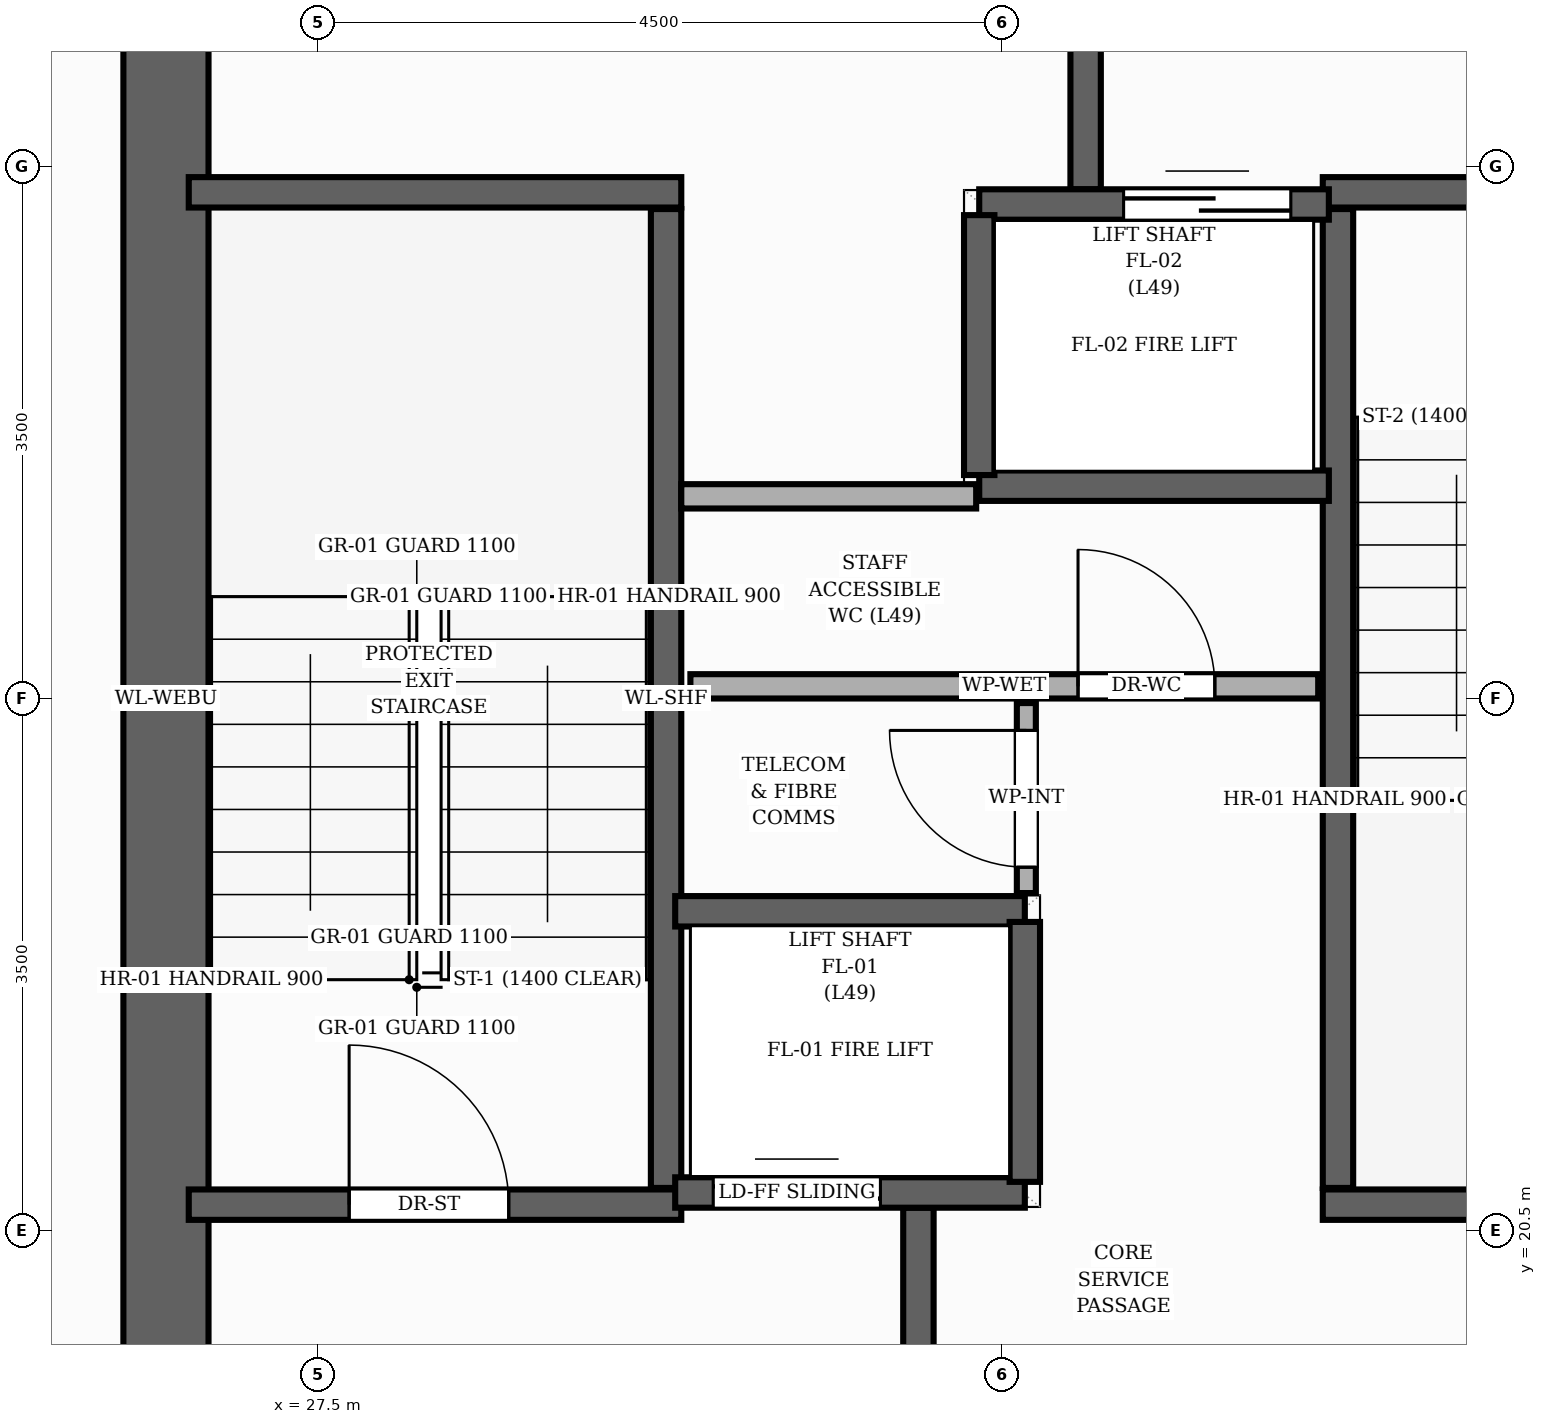
"""IFC4 building model, lengths in metres.
Left out: names, types, materials, properties, quantities, classifications, styles, units other than length and angle.
Written with IfcOpenShell. Run it as: python <this file> out.ifc"""

import sys

from ifc_helpers import new_model, si_unit, direction, frame, frame_2d, origin, place, context, subcontext, project, spatial, rectangle, extrude, element, fill, save


model = new_model("IFC4")
c1 = context("Model", 3, precision=1e-05, world=origin(), true_north=direction((0.0, 1.0)))
c2 = subcontext(c1, "Body", "Model", "MODEL_VIEW")
j1 = project(units=[si_unit("LENGTHUNIT", "METRE"), si_unit("PLANEANGLEUNIT", "RADIAN")], contexts=[c1])
p1 = place(None, origin())
s1 = spatial("IfcSite", under=j1, at=p1, CompositionType="ELEMENT")
p2 = place(p1, origin())
s2 = spatial("IfcBuilding", under=s1, at=p2, CompositionType="ELEMENT")
p3 = place(p2, frame((0.0, 0.0, 166.24)))
s3 = spatial("IfcBuildingStorey", under=s2, at=p3, CompositionType="ELEMENT", Elevation=166.24)
p4 = place(p3, frame((26.5, 17.3, 0.0), z_axis=(0.0, 0.0, 1.0), x_axis=(0.0, 1.0, 0.0)))
e1 = element("IfcWall", 1, at=p4, inside=s3, PredefinedType="SHEAR", context=c2, shape_type="SweptSolid", body=[
    extrude(rectangle(XDim=13.4, YDim=0.56, at=frame_2d((6.7, 0.0))), origin(), (0.0, 0.0, 1.0), 3.2),
])
p5 = place(p3, frame((29.79, 20.78, 0.0), z_axis=(0.0, 0.0, 1.0), x_axis=(0.0, 1.0, 0.0)))
e2 = element("IfcWall", 2, at=p5, inside=s3, PredefinedType="SHEAR", context=c2, shape_type="SweptSolid", body=[
    extrude(rectangle(XDim=6.44, YDim=0.2, at=frame_2d((3.22, 0.0))), origin(), (0.0, 0.0, 1.0), 3.2),
])
p6 = place(p3, frame((26.65, 27.33, 0.0), z_axis=(0.0, 0.0, 1.0), x_axis=(1.0, 0.0, 0.0)))
e3 = element("IfcWall", 3, at=p6, inside=s3, PredefinedType="SHEAR", context=c2, shape_type="SweptSolid", body=[
    extrude(rectangle(XDim=3.24, YDim=0.2, at=frame_2d((1.62, 0.0))), origin(), (0.0, 0.0, 1.0), 3.2),
])
p7 = place(p3, frame((26.65, 20.67, 0.0), z_axis=(0.0, 0.0, 1.0), x_axis=(1.0, 0.0, 0.0)))
e4 = element("IfcWall", 4, at=p7, inside=s3, PredefinedType="SHEAR", context=c2, shape_type="SweptSolid", body=[
    extrude(rectangle(XDim=3.24, YDim=0.2, at=frame_2d((1.62, 0.0))), origin(), (0.0, 0.0, 1.0), 3.2),
])
p8 = place(p7, frame((1.055, 0.0, 0.0)))
e5 = element("IfcOpeningElement", 5, at=p8, cuts=e4, PredefinedType="OPENING", context=c2, shape_type="SweptSolid", body=[
    extrude(rectangle(XDim=1.05, YDim=2.15, at=frame_2d((0.525, 1.075))), frame((0.0, 0.11, 0.0), z_axis=(0.0, -1.0, 0.0), x_axis=(1.0, 0.0, 0.0)), (0.0, 0.0, 1.0), 0.22),
])
p9 = place(p3, frame((34.21, 20.78, 0.0), z_axis=(0.0, 0.0, 1.0), x_axis=(0.0, 1.0, 0.0)))
e6 = element("IfcWall", 6, at=p9, inside=s3, PredefinedType="SHEAR", context=c2, shape_type="SweptSolid", body=[
    extrude(rectangle(XDim=6.44, YDim=0.2, at=frame_2d((3.22, 0.0))), origin(), (0.0, 0.0, 1.0), 3.2),
])
p10 = place(p3, frame((34.11, 20.67, 0.0), z_axis=(0.0, 0.0, 1.0), x_axis=(1.0, 0.0, 0.0)))
e7 = element("IfcWall", 7, at=p10, inside=s3, PredefinedType="SHEAR", context=c2, shape_type="SweptSolid", body=[
    extrude(rectangle(XDim=3.24, YDim=0.2, at=frame_2d((1.62, 0.0))), origin(), (0.0, 0.0, 1.0), 3.2),
])
p11 = place(p3, frame((34.11, 27.33, 0.0), z_axis=(0.0, 0.0, 1.0), x_axis=(1.0, 0.0, 0.0)))
e8 = element("IfcWall", 8, at=p11, inside=s3, PredefinedType="SHEAR", context=c2, shape_type="SweptSolid", body=[
    extrude(rectangle(XDim=3.24, YDim=0.2, at=frame_2d((1.62, 0.0))), origin(), (0.0, 0.0, 1.0), 3.2),
])
p12 = place(p11, frame((1.135, 0.0, 0.0)))
e9 = element("IfcOpeningElement", 9, at=p12, cuts=e8, PredefinedType="OPENING", context=c2, shape_type="SweptSolid", body=[
    extrude(rectangle(XDim=1.05, YDim=2.15, at=frame_2d((0.525, 1.075))), frame((0.0, 0.11, 0.0), z_axis=(0.0, -1.0, 0.0), x_axis=(1.0, 0.0, 0.0)), (0.0, 0.0, 1.0), 0.22),
])
for number, where, z_axis, x_axis in (
    (10, (31.45, 17.15, 0.0), (0.0, 0.0, 1.0), (0.0, 1.0, 0.0)),
    (11, (32.55, 27.35, 0.0), (0.0, 0.0, 1.0), (0.0, 1.0, 0.0)),
):
    element("IfcWall", number, at=place(p3, frame(where, z_axis=z_axis, x_axis=x_axis)), inside=s3, PredefinedType="SHEAR", context=c2, shape_type="SweptSolid", body=[
        extrude(rectangle(XDim=3.5, YDim=0.2, at=frame_2d((1.75, 0.0))), origin(), (0.0, 0.0, 1.0), 3.2),
    ])
p13 = place(p3, frame((29.85, 20.75, 0.0), z_axis=(0.0, 0.0, 1.0), x_axis=(1.0, 0.0, 0.0)))
e12 = element("IfcWall", 12, at=p13, inside=s3, PredefinedType="SHEAR", context=c2, shape_type="SweptSolid", body=[
    extrude(rectangle(XDim=2.3, YDim=0.2, at=frame_2d((1.15, 0.0))), origin(), (0.0, 0.0, 1.0), 3.2),
])
p14 = place(p13, frame((0.25, 0.0, 0.0)))
e13 = element("IfcOpeningElement", 13, at=p14, cuts=e12, PredefinedType="OPENING", context=c2, shape_type="SweptSolid", body=[
    extrude(rectangle(XDim=1.1, YDim=2.15, at=frame_2d((0.55, 1.075))), frame((0.0, 0.11, 0.0), z_axis=(0.0, -1.0, 0.0), x_axis=(1.0, 0.0, 0.0)), (0.0, 0.0, 1.0), 0.22),
])
p15 = place(p3, frame((29.85, 22.6, 0.0), z_axis=(0.0, 0.0, 1.0), x_axis=(1.0, 0.0, 0.0)))
e14 = element("IfcWall", 14, at=p15, inside=s3, PredefinedType="SHEAR", context=c2, shape_type="SweptSolid", body=[
    extrude(rectangle(XDim=2.3, YDim=0.2, at=frame_2d((1.15, 0.0))), origin(), (0.0, 0.0, 1.0), 3.2),
])
p16 = place(p3, frame((32.15, 20.82, 0.0), z_axis=(0.0, 0.0, 1.0), x_axis=(0.0, 1.0, 0.0)))
e15 = element("IfcWall", 15, at=p16, inside=s3, PredefinedType="SHEAR", context=c2, shape_type="SweptSolid", body=[
    extrude(rectangle(XDim=1.71, YDim=0.2, at=frame_2d((0.855, 0.0))), origin(), (0.0, 0.0, 1.0), 3.2),
])
p17 = place(p3, frame((31.85, 27.25, 0.0), z_axis=(0.0, 0.0, 1.0), x_axis=(1.0, 0.0, 0.0)))
e16 = element("IfcWall", 16, at=p17, inside=s3, PredefinedType="SHEAR", context=c2, shape_type="SweptSolid", body=[
    extrude(rectangle(XDim=2.3, YDim=0.2, at=frame_2d((1.15, 0.0))), origin(), (0.0, 0.0, 1.0), 3.2),
])
p18 = place(p17, frame((0.95, 0.0, 0.0)))
e17 = element("IfcOpeningElement", 17, at=p18, cuts=e16, PredefinedType="OPENING", context=c2, shape_type="SweptSolid", body=[
    extrude(rectangle(XDim=1.1, YDim=2.15, at=frame_2d((0.55, 1.075))), frame((0.0, 0.11, 0.0), z_axis=(0.0, -1.0, 0.0), x_axis=(1.0, 0.0, 0.0)), (0.0, 0.0, 1.0), 0.22),
])
p19 = place(p3, frame((31.85, 25.4, 0.0), z_axis=(0.0, 0.0, 1.0), x_axis=(1.0, 0.0, 0.0)))
e18 = element("IfcWall", 18, at=p19, inside=s3, PredefinedType="SHEAR", context=c2, shape_type="SweptSolid", body=[
    extrude(rectangle(XDim=2.3, YDim=0.2, at=frame_2d((1.15, 0.0))), origin(), (0.0, 0.0, 1.0), 3.2),
])
p20 = place(p3, frame((31.85, 25.47, 0.0), z_axis=(0.0, 0.0, 1.0), x_axis=(0.0, 1.0, 0.0)))
e19 = element("IfcWall", 19, at=p20, inside=s3, PredefinedType="SHEAR", context=c2, shape_type="SweptSolid", body=[
    extrude(rectangle(XDim=1.71, YDim=0.2, at=frame_2d((0.855, 0.0))), origin(), (0.0, 0.0, 1.0), 3.2),
])
p21 = place(p3, frame((29.95, 24.08, 0.0), z_axis=(0.0, 0.0, 1.0), x_axis=(1.0, 0.0, 0.0)))
e20 = element("IfcWall", 20, at=p21, inside=s3, PredefinedType="PLUMBINGWALL", context=c2, shape_type="SweptSolid", body=[
    extrude(rectangle(XDim=4.13, YDim=0.16, at=frame_2d((2.065, 0.0))), origin(), (0.0, 0.0, 1.0), 2.955),
])
p22 = place(p21, frame((2.55, 0.0, 0.0)))
e21 = element("IfcOpeningElement", 21, at=p22, cuts=e20, PredefinedType="OPENING", context=c2, shape_type="SweptSolid", body=[
    extrude(rectangle(XDim=0.9, YDim=2.1, at=frame_2d((0.45, 1.05))), frame((0.0, 0.09, 0.0), z_axis=(0.0, -1.0, 0.0), x_axis=(1.0, 0.0, 0.0)), (0.0, 0.0, 1.0), 0.18),
])
p23 = place(p3, frame((32.16, 22.72, 0.0), z_axis=(0.0, 0.0, 1.0), x_axis=(0.0, 1.0, 0.0)))
e22 = element("IfcWall", 22, at=p23, inside=s3, PredefinedType="PARTITIONING", context=c2, shape_type="SweptSolid", body=[
    extrude(rectangle(XDim=1.25, YDim=0.125, at=frame_2d((0.625, 0.0))), origin(), (0.0, 0.0, 1.0), 2.955),
])
p24 = place(p23, frame((0.17, 0.0, 0.0)))
e23 = element("IfcOpeningElement", 23, at=p24, cuts=e22, PredefinedType="OPENING", context=c2, shape_type="SweptSolid", body=[
    extrude(rectangle(XDim=0.9, YDim=2.1, at=frame_2d((0.45, 1.05))), frame((0.0, 0.073, 0.0), z_axis=(0.0, -1.0, 0.0), x_axis=(1.0, 0.0, 0.0)), (0.0, 0.0, 1.0), 0.145),
])
p25 = place(p3, frame((29.89, 25.33, 0.0), z_axis=(0.0, 0.0, 1.0), x_axis=(1.0, 0.0, 0.0)))
e24 = element("IfcWall", 24, at=p25, inside=s3, PredefinedType="PLUMBINGWALL", context=c2, shape_type="SweptSolid", body=[
    extrude(rectangle(XDim=1.94, YDim=0.16, at=frame_2d((0.97, 0.0))), origin(), (0.0, 0.0, 1.0), 2.955),
])
p26 = place(p8, origin())
e25 = element("IfcDoor", 25, at=p26, inside=s3, OperationType="SINGLE_SWING_LEFT", PredefinedType="DOOR", context=c2, shape_type="SweptSolid", body=[
    extrude(rectangle(XDim=1.05, YDim=2.15, at=frame_2d((0.525, 1.075))), frame((0.0, 0.025, 0.0), z_axis=(0.0, -1.0, 0.0), x_axis=(1.0, 0.0, 0.0)), (0.0, 0.0, 1.0), 0.05),
])
fill(e5, e25)
p27 = place(p14, origin())
e26 = element("IfcDoor", 26, at=p27, inside=s3, OperationType="DOUBLE_DOOR_SLIDING", PredefinedType="DOOR", context=c2, shape_type="SweptSolid", body=[
    extrude(rectangle(XDim=1.1, YDim=2.15, at=frame_2d((0.55, 1.075))), frame((0.0, 0.025, 0.0), z_axis=(0.0, -1.0, 0.0), x_axis=(1.0, 0.0, 0.0)), (0.0, 0.0, 1.0), 0.05),
])
fill(e13, e26)
p28 = place(p18, origin())
e27 = element("IfcDoor", 27, at=p28, inside=s3, OperationType="DOUBLE_DOOR_SLIDING", PredefinedType="DOOR", context=c2, shape_type="SweptSolid", body=[
    extrude(rectangle(XDim=1.1, YDim=2.15, at=frame_2d((0.55, 1.075))), frame((0.0, 0.025, 0.0), z_axis=(0.0, -1.0, 0.0), x_axis=(1.0, 0.0, 0.0)), (0.0, 0.0, 1.0), 0.05),
])
fill(e17, e27)
p29 = place(p22, origin())
e28 = element("IfcDoor", 28, at=p29, inside=s3, OperationType="SINGLE_SWING_LEFT", PredefinedType="DOOR", context=c2, shape_type="SweptSolid", body=[
    extrude(rectangle(XDim=0.9, YDim=2.1, at=frame_2d((0.45, 1.05))), frame((0.0, 0.025, 0.0), z_axis=(0.0, -1.0, 0.0), x_axis=(1.0, 0.0, 0.0)), (0.0, 0.0, 1.0), 0.05),
])
fill(e21, e28)
p30 = place(p24, origin())
e29 = element("IfcDoor", 29, at=p30, inside=s3, OperationType="SINGLE_SWING_RIGHT", PredefinedType="DOOR", context=c2, shape_type="SweptSolid", body=[
    extrude(rectangle(XDim=0.9, YDim=2.1, at=frame_2d((0.45, 1.05))), frame((0.0, 0.025, 0.0), z_axis=(0.0, -1.0, 0.0), x_axis=(1.0, 0.0, 0.0)), (0.0, 0.0, 1.0), 0.05),
])
fill(e23, e29)
save(model, sys.argv[1])
